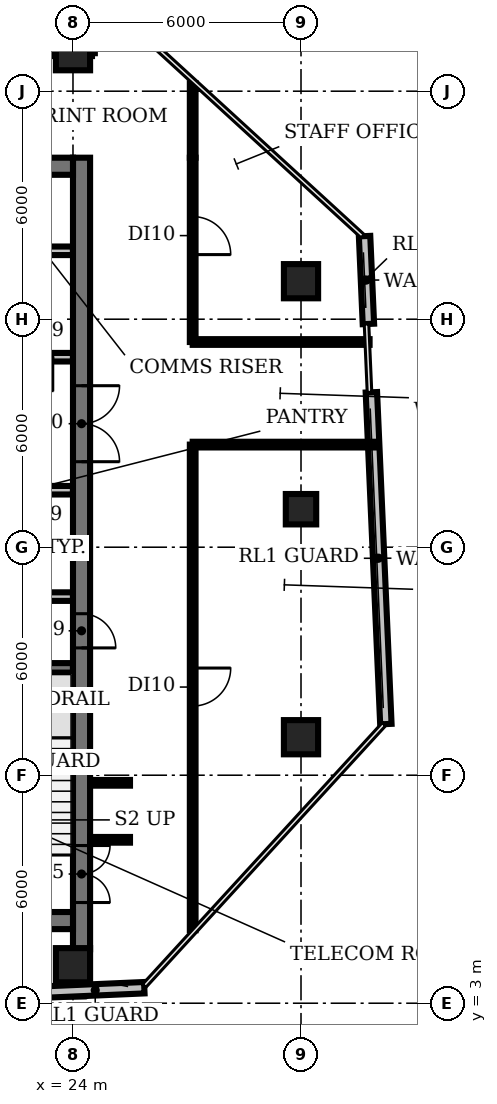
"""IFC4 building model, lengths in metres.
Left out: names, types, materials, properties, quantities, classifications, styles, units other than length and angle.
Written with IfcOpenShell. Run it as: python <this file> out.ifc"""

import sys

from ifc_helpers import new_model, si_unit, direction, frame, frame_2d, origin, origin_2d, place, context, subcontext, project, spatial, rectangle, circle, extrude, element, fill, save


model = new_model("IFC4")
c1 = context("Model", 3, precision=1e-05, world=origin(), true_north=direction((0.0, 1.0)))
c2 = subcontext(c1, "Body", "Model", "MODEL_VIEW")
j1 = project(units=[si_unit("LENGTHUNIT", "METRE"), si_unit("PLANEANGLEUNIT", "RADIAN")], contexts=[c1])
p1 = place(None, origin())
s1 = spatial("IfcSite", under=j1, at=p1, CompositionType="ELEMENT")
p2 = place(p1, origin())
s2 = spatial("IfcBuilding", under=s1, at=p2, CompositionType="ELEMENT")
p3 = place(p2, frame((0.0, 0.0, 218.0)))
s3 = spatial("IfcBuildingStorey", under=s2, at=p3, CompositionType="ELEMENT", Elevation=218.0)
for number, where, z_axis, x_axis in (
    (1, (24.0, 4.0, 0.0), (0.0, 0.0, 1.0), (1.0, 0.0, 0.0)),
    (2, (24.0, 28.0, 0.0), (0.0, 0.0, 1.0), (1.0, 0.0, 0.0)),
    (3, (30.0, 10.0, 0.0), (0.0, 0.0, 1.0), (1.0, 0.0, 0.0)),
):
    element("IfcColumn", number, at=place(p3, frame(where, z_axis=z_axis, x_axis=x_axis)), inside=s3, PredefinedType="COLUMN", context=c2, shape_type="SweptSolid", body=[
        extrude(circle(Radius=0.45, at=origin_2d()), origin(), (0.0, 0.0, 1.0), 3.85),
    ])
p4 = place(p3, frame((30.0, 16.0, 0.0), z_axis=(0.0, 0.0, 1.0), x_axis=(1.0, 0.0, 0.0)))
e4 = element("IfcColumn", 4, at=p4, inside=s3, PredefinedType="COLUMN", context=c2, shape_type="SweptSolid", body=[
    extrude(rectangle(XDim=0.8, YDim=0.8, at=origin_2d()), origin(), (0.0, 0.0, 1.0), 3.85),
])
p5 = place(p3, frame((30.0, 22.0, 0.0), z_axis=(0.0, 0.0, 1.0), x_axis=(1.0, 0.0, 0.0)))
e5 = element("IfcColumn", 5, at=p5, inside=s3, PredefinedType="COLUMN", context=c2, shape_type="SweptSolid", body=[
    extrude(circle(Radius=0.45, at=origin_2d()), origin(), (0.0, 0.0, 1.0), 3.85),
])
p6 = place(p3, frame((16.816, 3.013, 0.0), z_axis=(0.0, 0.0, 1.0), x_axis=(0.99904857496, 0.043611292917, 0.0)))
e6 = element("IfcWall", 6, at=p6, inside=s3, PredefinedType="SOLIDWALL", context=c2, shape_type="SweptSolid", body=[
    extrude(rectangle(XDim=9.069, YDim=0.3, at=frame_2d((4.534, 0.0))), origin(), (0.0, 0.0, 1.0), 3.85),
])
p7 = place(p3, frame((32.233, 10.345, 0.0), z_axis=(0.0, 0.0, 1.0), x_axis=(-0.043605726563, 0.999048817932, 0.0)))
e7 = element("IfcWall", 7, at=p7, inside=s3, PredefinedType="SOLIDWALL", context=c2, shape_type="SweptSolid", body=[
    extrude(rectangle(XDim=8.74, YDim=0.3, at=frame_2d((4.37, 0.0))), origin(), (0.0, 0.0, 1.0), 3.85),
])
p8 = place(p3, frame((31.773, 20.875, 0.0), z_axis=(0.0, 0.0, 1.0), x_axis=(-0.043588366225, 0.999049575512, 0.0)))
e8 = element("IfcWall", 8, at=p8, inside=s3, PredefinedType="SOLIDWALL", context=c2, shape_type="SweptSolid", body=[
    extrude(rectangle(XDim=2.313, YDim=0.3, at=frame_2d((1.157, 0.0))), origin(), (0.0, 0.0, 1.0), 3.85),
])
p9 = place(p3, frame((20.85, 11.825, 0.0), z_axis=(0.0, 0.0, 1.0), x_axis=(1.0, 0.0, 0.0)))
e9 = element("IfcWall", 9, at=p9, inside=s3, PredefinedType="SHEAR", context=c2, shape_type="SweptSolid", body=[
    extrude(rectangle(XDim=3.15, YDim=0.25, at=frame_2d((1.575, 0.0))), origin(), (0.0, 0.0, 1.0), 3.85),
])
p10 = place(p3, frame((16.6, 13.7, 0.0), z_axis=(0.0, 0.0, 1.0), x_axis=(1.0, 0.0, 0.0)))
e10 = element("IfcWall", 10, at=p10, inside=s3, PredefinedType="PARTITIONING", context=c2, shape_type="SweptSolid", body=[
    extrude(rectangle(XDim=7.4, YDim=0.225, at=frame_2d((3.7, 0.0))), origin(), (0.0, 0.0, 1.0), 3.85),
])
p11 = place(p3, frame((9.4, 16.5, 0.0), z_axis=(0.0, 0.0, 1.0), x_axis=(1.0, 0.0, 0.0)))
e11 = element("IfcWall", 11, at=p11, inside=s3, PredefinedType="PARTITIONING", context=c2, shape_type="SweptSolid", body=[
    extrude(rectangle(XDim=14.6, YDim=0.225, at=frame_2d((7.3, 0.0))), origin(), (0.0, 0.0, 1.0), 3.85),
])
p12 = place(p11, frame((1.9, 0.0, 0.0)))
e12 = element("IfcOpeningElement", 12, at=p12, cuts=e11, PredefinedType="OPENING", context=c2, shape_type="SweptSolid", body=[
    extrude(rectangle(XDim=1.0, YDim=2.1, at=frame_2d((0.5, 1.05))), frame((0.0, 0.123, 0.0), z_axis=(0.0, -1.0, 0.0), x_axis=(1.0, 0.0, 0.0)), (0.0, 0.0, 1.0), 0.245),
])
p13 = place(p11, frame((7.475, 0.0, 0.0)))
e13 = element("IfcOpeningElement", 13, at=p13, cuts=e11, PredefinedType="OPENING", context=c2, shape_type="SweptSolid", body=[
    extrude(rectangle(XDim=1.0, YDim=2.1, at=frame_2d((0.5, 1.05))), frame((0.0, 0.123, 0.0), z_axis=(0.0, -1.0, 0.0), x_axis=(1.0, 0.0, 0.0)), (0.0, 0.0, 1.0), 0.245),
])
p14 = place(p11, frame((11.308, 0.0, 0.0)))
e14 = element("IfcOpeningElement", 14, at=p14, cuts=e11, PredefinedType="OPENING", context=c2, shape_type="SweptSolid", body=[
    extrude(rectangle(XDim=0.9, YDim=2.1, at=frame_2d((0.45, 1.05))), frame((0.0, 0.123, 0.0), z_axis=(0.0, -1.0, 0.0), x_axis=(1.0, 0.0, 0.0)), (0.0, 0.0, 1.0), 0.245),
])
p15 = place(p11, frame((13.083, 0.0, 0.0)))
e15 = element("IfcOpeningElement", 15, at=p15, cuts=e11, PredefinedType="OPENING", context=c2, shape_type="SweptSolid", body=[
    extrude(rectangle(XDim=0.9, YDim=2.1, at=frame_2d((0.45, 1.05))), frame((0.0, 0.123, 0.0), z_axis=(0.0, -1.0, 0.0), x_axis=(1.0, 0.0, 0.0)), (0.0, 0.0, 1.0), 0.245),
])
p16 = place(p3, frame((24.0, 20.0, 0.0), z_axis=(0.0, 0.0, 1.0), x_axis=(-1.0, 0.0, 0.0)))
e16 = element("IfcWall", 16, at=p16, inside=s3, PredefinedType="PARTITIONING", context=c2, shape_type="SweptSolid", body=[
    extrude(rectangle(XDim=14.6, YDim=0.225, at=frame_2d((7.3, 0.0))), origin(), (0.0, 0.0, 1.0), 3.85),
])
p17 = place(p16, frame((12.75, 0.0, 0.0)))
e17 = element("IfcOpeningElement", 17, at=p17, cuts=e16, PredefinedType="OPENING", context=c2, shape_type="SweptSolid", body=[
    extrude(rectangle(XDim=1.1, YDim=2.1, at=frame_2d((0.55, 1.05))), frame((0.0, 0.123, 0.0), z_axis=(0.0, -1.0, 0.0), x_axis=(1.0, 0.0, 0.0)), (0.0, 0.0, 1.0), 0.245),
])
p18 = place(p16, frame((9.95, 0.0, 0.0)))
e18 = element("IfcOpeningElement", 18, at=p18, cuts=e16, PredefinedType="OPENING", context=c2, shape_type="SweptSolid", body=[
    extrude(rectangle(XDim=1.1, YDim=2.1, at=frame_2d((0.55, 1.05))), frame((0.0, 0.123, 0.0), z_axis=(0.0, -1.0, 0.0), x_axis=(1.0, 0.0, 0.0)), (0.0, 0.0, 1.0), 0.245),
])
p19 = place(p16, frame((7.15, 0.0, 0.0)))
e19 = element("IfcOpeningElement", 19, at=p19, cuts=e16, PredefinedType="OPENING", context=c2, shape_type="SweptSolid", body=[
    extrude(rectangle(XDim=1.1, YDim=2.1, at=frame_2d((0.55, 1.05))), frame((0.0, 0.123, 0.0), z_axis=(0.0, -1.0, 0.0), x_axis=(1.0, 0.0, 0.0)), (0.0, 0.0, 1.0), 0.245),
])
p20 = place(p16, frame((4.35, 0.0, 0.0)))
e20 = element("IfcOpeningElement", 20, at=p20, cuts=e16, PredefinedType="OPENING", context=c2, shape_type="SweptSolid", body=[
    extrude(rectangle(XDim=1.1, YDim=2.1, at=frame_2d((0.55, 1.05))), frame((0.0, 0.123, 0.0), z_axis=(0.0, -1.0, 0.0), x_axis=(1.0, 0.0, 0.0)), (0.0, 0.0, 1.0), 0.245),
])
p21 = place(p16, frame((2.308, 0.0, 0.0)))
e21 = element("IfcOpeningElement", 21, at=p21, cuts=e16, PredefinedType="OPENING", context=c2, shape_type="SweptSolid", body=[
    extrude(rectangle(XDim=0.9, YDim=2.1, at=frame_2d((0.45, 1.05))), frame((0.0, 0.123, 0.0), z_axis=(0.0, -1.0, 0.0), x_axis=(1.0, 0.0, 0.0)), (0.0, 0.0, 1.0), 0.245),
])
p22 = place(p16, frame((0.532, 0.0, 0.0)))
e22 = element("IfcOpeningElement", 22, at=p22, cuts=e16, PredefinedType="OPENING", context=c2, shape_type="SweptSolid", body=[
    extrude(rectangle(XDim=0.9, YDim=2.1, at=frame_2d((0.45, 1.05))), frame((0.0, 0.123, 0.0), z_axis=(0.0, -1.0, 0.0), x_axis=(1.0, 0.0, 0.0)), (0.0, 0.0, 1.0), 0.245),
])
p23 = place(p3, frame((9.4, 22.8, 0.0), z_axis=(0.0, 0.0, 1.0), x_axis=(1.0, 0.0, 0.0)))
e23 = element("IfcWall", 23, at=p23, inside=s3, PredefinedType="PARTITIONING", context=c2, shape_type="SweptSolid", body=[
    extrude(rectangle(XDim=14.6, YDim=0.225, at=frame_2d((7.3, 0.0))), origin(), (0.0, 0.0, 1.0), 3.85),
])
p24 = place(p3, frame((24.225, 25.25, 0.0), z_axis=(0.0, 0.0, 1.0), x_axis=(0.0, -1.0, 0.0)))
e24 = element("IfcWall", 24, at=p24, inside=s3, PredefinedType="SHEAR", context=c2, shape_type="SweptSolid", body=[
    extrude(rectangle(XDim=20.83, YDim=0.45, at=frame_2d((10.415, 0.0))), origin(), (0.0, 0.0, 1.0), 3.85),
])
p25 = place(p24, frame((18.1, 0.0, 0.0)))
e25 = element("IfcOpeningElement", 25, at=p25, cuts=e24, PredefinedType="OPENING", context=c2, shape_type="SweptSolid", body=[
    extrude(rectangle(XDim=1.5, YDim=2.1, at=frame_2d((0.75, 1.05))), frame((0.0, 0.235, 0.0), z_axis=(0.0, -1.0, 0.0), x_axis=(1.0, 0.0, 0.0)), (0.0, 0.0, 1.0), 0.47),
])
p26 = place(p24, frame((12.0, 0.0, 0.0)))
e26 = element("IfcOpeningElement", 26, at=p26, cuts=e24, PredefinedType="OPENING", context=c2, shape_type="SweptSolid", body=[
    extrude(rectangle(XDim=0.9, YDim=2.1, at=frame_2d((0.45, 1.05))), frame((0.0, 0.235, 0.0), z_axis=(0.0, -1.0, 0.0), x_axis=(1.0, 0.0, 0.0)), (0.0, 0.0, 1.0), 0.47),
])
p27 = place(p24, frame((6.0, 0.0, 0.0)))
e27 = element("IfcOpeningElement", 27, at=p27, cuts=e24, PredefinedType="OPENING", context=c2, shape_type="SweptSolid", body=[
    extrude(rectangle(XDim=2.0, YDim=2.1, at=frame_2d((1.0, 1.05))), frame((0.0, 0.235, 0.0), z_axis=(0.0, -1.0, 0.0), x_axis=(1.0, 0.0, 0.0)), (0.0, 0.0, 1.0), 0.47),
])
p28 = place(p3, frame((24.0, 5.175, 0.0), z_axis=(0.0, 0.0, 1.0), x_axis=(-1.0, 0.0, 0.0)))
e28 = element("IfcWall", 28, at=p28, inside=s3, PredefinedType="SHEAR", context=c2, shape_type="SweptSolid", body=[
    extrude(rectangle(XDim=18.0, YDim=0.45, at=frame_2d((9.0, 0.0))), origin(), (0.0, 0.0, 1.0), 3.85),
])
p29 = place(p28, frame((0.825, 0.0, 0.0)))
e29 = element("IfcOpeningElement", 29, at=p29, cuts=e28, PredefinedType="OPENING", context=c2, shape_type="SweptSolid", body=[
    extrude(rectangle(XDim=1.5, YDim=2.1, at=frame_2d((0.75, 1.05))), frame((0.0, 0.235, 0.0), z_axis=(0.0, -1.0, 0.0), x_axis=(1.0, 0.0, 0.0)), (0.0, 0.0, 1.0), 0.47),
])
p30 = place(p28, frame((15.675, 0.0, 0.0)))
e30 = element("IfcOpeningElement", 30, at=p30, cuts=e28, PredefinedType="OPENING", context=c2, shape_type="SweptSolid", body=[
    extrude(rectangle(XDim=1.5, YDim=2.1, at=frame_2d((0.75, 1.05))), frame((0.0, 0.235, 0.0), z_axis=(0.0, -1.0, 0.0), x_axis=(1.0, 0.0, 0.0)), (0.0, 0.0, 1.0), 0.47),
])
p31 = place(p28, frame((13.0, 0.0, 0.0)))
e31 = element("IfcOpeningElement", 31, at=p31, cuts=e28, PredefinedType="OPENING", context=c2, shape_type="SweptSolid", body=[
    extrude(rectangle(XDim=1.2, YDim=2.1, at=frame_2d((0.6, 1.05))), frame((0.0, 0.235, 0.0), z_axis=(0.0, -1.0, 0.0), x_axis=(1.0, 0.0, 0.0)), (0.0, 0.0, 1.0), 0.47),
])
p32 = place(p28, frame((4.4, 0.0, 0.0)))
e32 = element("IfcOpeningElement", 32, at=p32, cuts=e28, PredefinedType="OPENING", context=c2, shape_type="SweptSolid", body=[
    extrude(rectangle(XDim=1.0, YDim=2.1, at=frame_2d((0.5, 1.05))), frame((0.0, 0.235, 0.0), z_axis=(0.0, -1.0, 0.0), x_axis=(1.0, 0.0, 0.0)), (0.0, 0.0, 1.0), 0.47),
])
p33 = place(p3, frame((6.0, 25.025, 0.0), z_axis=(0.0, 0.0, 1.0), x_axis=(1.0, 0.0, 0.0)))
e33 = element("IfcWall", 33, at=p33, inside=s3, PredefinedType="SHEAR", context=c2, shape_type="SweptSolid", body=[
    extrude(rectangle(XDim=18.0, YDim=0.45, at=frame_2d((9.0, 0.0))), origin(), (0.0, 0.0, 1.0), 3.85),
])
p34 = place(p3, frame((23.5, 28.0, 0.0), z_axis=(0.0, 0.0, 1.0), x_axis=(0.0, 1.0, 0.0)))
e34 = element("IfcWall", 34, at=p34, inside=s3, PredefinedType="PARTITIONING", context=c2, shape_type="SweptSolid", body=[
    extrude(rectangle(XDim=1.15, YDim=0.15, at=frame_2d((0.575, 0.0))), origin(), (0.0, 0.0, 1.0), 2.88),
])
p35 = place(p3, frame((23.5, 28.0, 0.0), z_axis=(0.0, 0.0, 1.0), x_axis=(1.0, 0.0, 0.0)))
e35 = element("IfcWall", 35, at=p35, inside=s3, PredefinedType="PARTITIONING", context=c2, shape_type="SweptSolid", body=[
    extrude(rectangle(XDim=1.0, YDim=0.15, at=frame_2d((0.5, 0.0))), origin(), (0.0, 0.0, 1.0), 2.88),
])
for number, where, z_axis, x_axis in (
    (36, (24.45, 7.3, 0.0), (0.0, 0.0, 1.0), (1.0, 0.0, 0.0)),
    (37, (24.45, 8.8, 0.0), (0.0, 0.0, 1.0), (1.0, 0.0, 0.0)),
):
    element("IfcWall", number, at=place(p3, frame(where, z_axis=z_axis, x_axis=x_axis)), inside=s3, PredefinedType="PARTITIONING", context=c2, shape_type="SweptSolid", body=[
        extrude(rectangle(XDim=1.05, YDim=0.15, at=frame_2d((0.525, 0.0))), origin(), (0.0, 0.0, 1.0), 2.88),
    ])
p36 = place(p3, frame((24.5, 28.0, 0.0), z_axis=(0.0, 0.0, 1.0), x_axis=(0.0, 1.0, 0.0)))
e38 = element("IfcWall", 38, at=p36, inside=s3, PredefinedType="PARTITIONING", context=c2, shape_type="SweptSolid", body=[
    extrude(rectangle(XDim=1.15, YDim=0.15, at=frame_2d((0.575, 0.0))), origin(), (0.0, 0.0, 1.0), 2.88),
])
p37 = place(p3, frame((27.15, 17.7, 0.0), z_axis=(0.0, 0.0, 1.0), x_axis=(0.0, -1.0, 0.0)))
e39 = element("IfcWall", 39, at=p37, inside=s3, PredefinedType="PARTITIONING", context=c2, shape_type="SweptSolid", body=[
    extrude(rectangle(XDim=12.78, YDim=0.15, at=frame_2d((6.39, 0.0))), origin(), (0.0, 0.0, 1.0), 2.88),
])
p38 = place(p37, frame((5.88, 0.0, 0.0)))
e40 = element("IfcOpeningElement", 40, at=p38, cuts=e39, PredefinedType="OPENING", context=c2, shape_type="SweptSolid", body=[
    extrude(rectangle(XDim=1.0, YDim=2.1, at=frame_2d((0.5, 1.05))), frame((0.0, 0.085, 0.0), z_axis=(0.0, -1.0, 0.0), x_axis=(1.0, 0.0, 0.0)), (0.0, 0.0, 1.0), 0.17),
])
p39 = place(p3, frame((27.15, 17.7, 0.0), z_axis=(0.0, 0.0, 1.0), x_axis=(1.0, 0.0, 0.0)))
e41 = element("IfcWall", 41, at=p39, inside=s3, PredefinedType="PARTITIONING", context=c2, shape_type="SweptSolid", body=[
    extrude(rectangle(XDim=4.772, YDim=0.15, at=frame_2d((2.386, 0.0))), origin(), (0.0, 0.0, 1.0), 2.88),
])
p40 = place(p3, frame((27.15, 20.4, 0.0), z_axis=(0.0, 0.0, 1.0), x_axis=(1.0, 0.0, 0.0)))
e42 = element("IfcWall", 42, at=p40, inside=s3, PredefinedType="PARTITIONING", context=c2, shape_type="SweptSolid", body=[
    extrude(rectangle(XDim=4.655, YDim=0.15, at=frame_2d((2.327, 0.0))), origin(), (0.0, 0.0, 1.0), 2.88),
])
p41 = place(p3, frame((27.15, 25.25, 0.0), z_axis=(0.0, 0.0, 1.0), x_axis=(0.0, -1.0, 0.0)))
e43 = element("IfcWall", 43, at=p41, inside=s3, PredefinedType="PARTITIONING", context=c2, shape_type="SweptSolid", body=[
    extrude(rectangle(XDim=4.85, YDim=0.15, at=frame_2d((2.425, 0.0))), origin(), (0.0, 0.0, 1.0), 2.88),
])
p42 = place(p41, frame((1.55, 0.0, 0.0)))
e44 = element("IfcOpeningElement", 44, at=p42, cuts=e43, PredefinedType="OPENING", context=c2, shape_type="SweptSolid", body=[
    extrude(rectangle(XDim=1.0, YDim=2.1, at=frame_2d((0.5, 1.05))), frame((0.0, 0.085, 0.0), z_axis=(0.0, -1.0, 0.0), x_axis=(1.0, 0.0, 0.0)), (0.0, 0.0, 1.0), 0.17),
])
p43 = place(p3, frame((27.15, 25.25, 0.0), z_axis=(0.0, 0.0, 1.0), x_axis=(0.0, 1.0, 0.0)))
e45 = element("IfcWall", 45, at=p43, inside=s3, PredefinedType="PARTITIONING", context=c2, shape_type="SweptSolid", body=[
    extrude(rectangle(XDim=1.96, YDim=0.15, at=frame_2d((0.98, 0.0))), origin(), (0.0, 0.0, 1.0), 2.88),
])
p44 = place(p22, origin())
e46 = element("IfcDoor", 46, at=p44, inside=s3, OperationType="SINGLE_SWING_LEFT", PredefinedType="DOOR", context=c2, shape_type="SweptSolid", body=[
    extrude(rectangle(XDim=0.9, YDim=2.1, at=frame_2d((0.45, 1.05))), frame((0.0, 0.025, 0.0), z_axis=(0.0, -1.0, 0.0), x_axis=(1.0, 0.0, 0.0)), (0.0, 0.0, 1.0), 0.05),
])
fill(e22, e46)
p45 = place(p25, origin())
e47 = element("IfcDoor", 47, at=p45, inside=s3, OperationType="DOUBLE_DOOR_SINGLE_SWING", PredefinedType="DOOR", context=c2, shape_type="SweptSolid", body=[
    extrude(rectangle(XDim=1.5, YDim=2.1, at=frame_2d((0.75, 1.05))), frame((0.0, 0.025, 0.0), z_axis=(0.0, -1.0, 0.0), x_axis=(1.0, 0.0, 0.0)), (0.0, 0.0, 1.0), 0.05),
])
fill(e25, e47)
p46 = place(p26, origin())
e48 = element("IfcDoor", 48, at=p46, inside=s3, OperationType="SINGLE_SWING_RIGHT", PredefinedType="DOOR", context=c2, shape_type="SweptSolid", body=[
    extrude(rectangle(XDim=0.9, YDim=2.1, at=frame_2d((0.45, 1.05))), frame((0.0, 0.025, 0.0), z_axis=(0.0, -1.0, 0.0), x_axis=(1.0, 0.0, 0.0)), (0.0, 0.0, 1.0), 0.05),
])
fill(e26, e48)
p47 = place(p27, origin())
e49 = element("IfcDoor", 49, at=p47, inside=s3, OperationType="DOUBLE_DOOR_SINGLE_SWING", PredefinedType="DOOR", context=c2, shape_type="SweptSolid", body=[
    extrude(rectangle(XDim=2.0, YDim=2.1, at=frame_2d((1.0, 1.05))), frame((0.0, 0.025, 0.0), z_axis=(0.0, -1.0, 0.0), x_axis=(1.0, 0.0, 0.0)), (0.0, 0.0, 1.0), 0.05),
])
fill(e27, e49)
p48 = place(p38, origin())
e50 = element("IfcDoor", 50, at=p48, inside=s3, OperationType="SINGLE_SWING_LEFT", PredefinedType="DOOR", context=c2, shape_type="SweptSolid", body=[
    extrude(rectangle(XDim=1.0, YDim=2.1, at=frame_2d((0.5, 1.05))), frame((0.0, 0.025, 0.0), z_axis=(0.0, -1.0, 0.0), x_axis=(1.0, 0.0, 0.0)), (0.0, 0.0, 1.0), 0.05),
])
fill(e40, e50)
p49 = place(p42, origin())
e51 = element("IfcDoor", 51, at=p49, inside=s3, OperationType="SINGLE_SWING_RIGHT", PredefinedType="DOOR", context=c2, shape_type="SweptSolid", body=[
    extrude(rectangle(XDim=1.0, YDim=2.1, at=frame_2d((0.5, 1.05))), frame((0.0, 0.025, 0.0), z_axis=(0.0, -1.0, 0.0), x_axis=(1.0, 0.0, 0.0)), (0.0, 0.0, 1.0), 0.05),
])
fill(e44, e51)
save(model, sys.argv[1])
